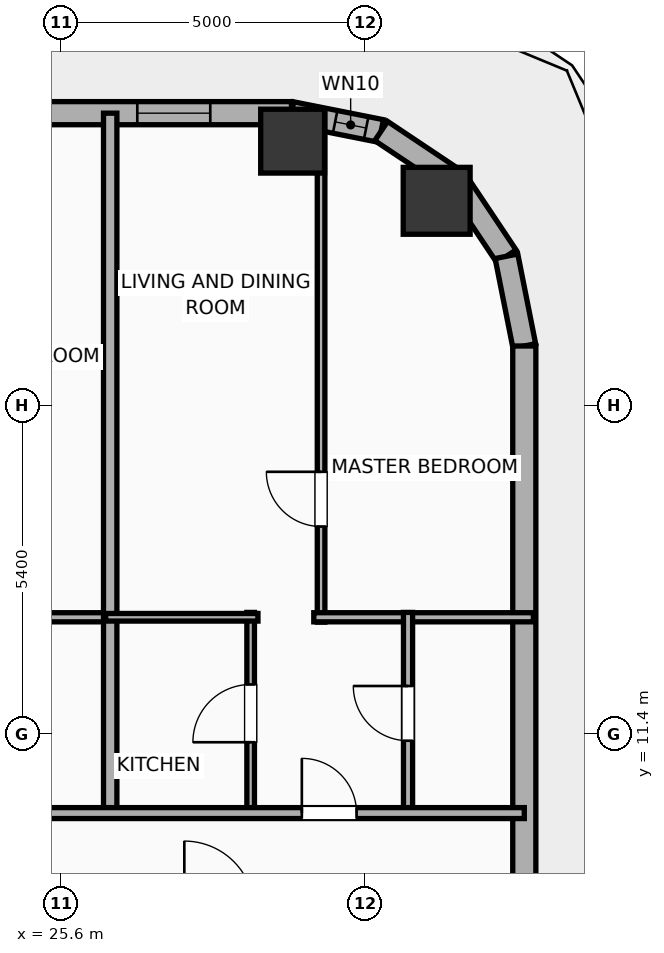
"""IFC4 building model, lengths in metres.
Left out: names, types, materials, properties, quantities, classifications, styles, units other than length and angle.
Written with IfcOpenShell. Run it as: python <this file> out.ifc"""

import sys

from ifc_helpers import new_model, si_unit, direction, frame, frame_2d, origin, origin_2d, place, context, subcontext, project, spatial, rectangle, hollow_rectangle, hollow_circle, extrude, element, fill, save


model = new_model("IFC4")
c1 = context("Model", 3, precision=1e-05, world=origin(), true_north=direction((0.0, 1.0)))
c2 = subcontext(c1, "Body", "Model", "MODEL_VIEW")
j1 = project(units=[si_unit("LENGTHUNIT", "METRE"), si_unit("PLANEANGLEUNIT", "RADIAN")], contexts=[c1])
p1 = place(None, origin())
s1 = spatial("IfcSite", under=j1, at=p1, CompositionType="ELEMENT")
p2 = place(p1, origin())
s2 = spatial("IfcBuilding", under=s1, at=p2, CompositionType="ELEMENT")
p3 = place(p2, frame((0.0, 0.0, 113.1)))
s3 = spatial("IfcBuildingStorey", under=s2, at=p3, CompositionType="ELEMENT", Elevation=113.1)
p4 = place(p3, frame((31.769, 20.169, 0.0), z_axis=(0.0, 0.0, 1.0), x_axis=(1.0, 0.0, 0.0)))
e1 = element("IfcColumn", 1, at=p4, inside=s3, PredefinedType="COLUMN", context=c2, shape_type="SweptSolid", body=[
    extrude(hollow_circle(Radius=0.55, WallThickness=0.036, at=origin_2d()), origin(), (0.0, 0.0, 1.0), 3.9),
])
p5 = place(p3, frame((29.4, 21.15, 0.0), z_axis=(0.0, 0.0, 1.0), x_axis=(1.0, 0.0, 0.0)))
e2 = element("IfcColumn", 2, at=p5, inside=s3, PredefinedType="COLUMN", context=c2, shape_type="SweptSolid", body=[
    extrude(hollow_rectangle(XDim=1.05, YDim=1.05, WallThickness=0.036, at=origin_2d()), origin(), (0.0, 0.0, 1.0), 3.9),
])
p6 = place(p3, frame((-25.381, 21.61, 0.0), z_axis=(0.0, 0.0, 1.0), x_axis=(1.0, 0.0, 0.0)))
e3 = element("IfcWall", 3, at=p6, inside=s3, PredefinedType="ELEMENTEDWALL", context=c2, shape_type="SweptSolid", body=[
    extrude(rectangle(XDim=54.763, YDim=0.38, at=frame_2d((27.381, 0.0))), origin(), (0.0, 0.0, 1.0), 3.65),
])
p7 = place(p6, frame((5.645, 0.0, 0.75)))
e4 = element("IfcOpeningElement", 4, at=p7, cuts=e3, PredefinedType="OPENING", context=c2, shape_type="SweptSolid", body=[
    extrude(rectangle(XDim=2.4, YDim=2.1, at=frame_2d((1.2, 1.05))), frame((0.0, 0.2, 0.0), z_axis=(0.0, -1.0, 0.0), x_axis=(1.0, 0.0, 0.0)), (0.0, 0.0, 1.0), 0.4),
])
p8 = place(p6, frame((34.677, 0.0, 0.75)))
e5 = element("IfcOpeningElement", 5, at=p8, cuts=e3, PredefinedType="OPENING", context=c2, shape_type="SweptSolid", body=[
    extrude(rectangle(XDim=2.4, YDim=2.1, at=frame_2d((1.2, 1.05))), frame((0.0, 0.2, 0.0), z_axis=(0.0, -1.0, 0.0), x_axis=(1.0, 0.0, 0.0)), (0.0, 0.0, 1.0), 0.4),
])
p9 = place(p6, frame((45.067, 0.0, 0.75)))
e6 = element("IfcOpeningElement", 6, at=p9, cuts=e3, PredefinedType="OPENING", context=c2, shape_type="SweptSolid", body=[
    extrude(rectangle(XDim=2.4, YDim=2.1, at=frame_2d((1.2, 1.05))), frame((0.0, 0.2, 0.0), z_axis=(0.0, -1.0, 0.0), x_axis=(1.0, 0.0, 0.0)), (0.0, 0.0, 1.0), 0.4),
])
p10 = place(p6, frame((2.938, 0.0, 0.75)))
e7 = element("IfcOpeningElement", 7, at=p10, cuts=e3, PredefinedType="OPENING", context=c2, shape_type="SweptSolid", body=[
    extrude(rectangle(XDim=1.2, YDim=2.05, at=frame_2d((0.6, 1.025))), frame((0.0, 0.2, 0.0), z_axis=(0.0, -1.0, 0.0), x_axis=(1.0, 0.0, 0.0)), (0.0, 0.0, 1.0), 0.4),
])
p11 = place(p6, frame((8.916, 0.0, 0.75)))
e8 = element("IfcOpeningElement", 8, at=p11, cuts=e3, PredefinedType="OPENING", context=c2, shape_type="SweptSolid", body=[
    extrude(rectangle(XDim=1.2, YDim=2.05, at=frame_2d((0.6, 1.025))), frame((0.0, 0.2, 0.0), z_axis=(0.0, -1.0, 0.0), x_axis=(1.0, 0.0, 0.0)), (0.0, 0.0, 1.0), 0.4),
])
p12 = place(p6, frame((13.476, 0.0, 0.75)))
e9 = element("IfcOpeningElement", 9, at=p12, cuts=e3, PredefinedType="OPENING", context=c2, shape_type="SweptSolid", body=[
    extrude(rectangle(XDim=1.2, YDim=2.05, at=frame_2d((0.6, 1.025))), frame((0.0, 0.2, 0.0), z_axis=(0.0, -1.0, 0.0), x_axis=(1.0, 0.0, 0.0)), (0.0, 0.0, 1.0), 0.4),
])
p13 = place(p6, frame((17.076, 0.0, 0.75)))
e10 = element("IfcOpeningElement", 10, at=p13, cuts=e3, PredefinedType="OPENING", context=c2, shape_type="SweptSolid", body=[
    extrude(rectangle(XDim=1.2, YDim=2.05, at=frame_2d((0.6, 1.025))), frame((0.0, 0.2, 0.0), z_axis=(0.0, -1.0, 0.0), x_axis=(1.0, 0.0, 0.0)), (0.0, 0.0, 1.0), 0.4),
])
p14 = place(p6, frame((19.956, 0.0, 0.75)))
e11 = element("IfcOpeningElement", 11, at=p14, cuts=e3, PredefinedType="OPENING", context=c2, shape_type="SweptSolid", body=[
    extrude(rectangle(XDim=1.2, YDim=2.05, at=frame_2d((0.6, 1.025))), frame((0.0, 0.2, 0.0), z_axis=(0.0, -1.0, 0.0), x_axis=(1.0, 0.0, 0.0)), (0.0, 0.0, 1.0), 0.4),
])
p15 = place(p6, frame((24.276, 0.0, 0.75)))
e12 = element("IfcOpeningElement", 12, at=p15, cuts=e3, PredefinedType="OPENING", context=c2, shape_type="SweptSolid", body=[
    extrude(rectangle(XDim=1.2, YDim=2.05, at=frame_2d((0.6, 1.025))), frame((0.0, 0.2, 0.0), z_axis=(0.0, -1.0, 0.0), x_axis=(1.0, 0.0, 0.0)), (0.0, 0.0, 1.0), 0.4),
])
p16 = place(p6, frame((27.876, 0.0, 0.75)))
e13 = element("IfcOpeningElement", 13, at=p16, cuts=e3, PredefinedType="OPENING", context=c2, shape_type="SweptSolid", body=[
    extrude(rectangle(XDim=1.2, YDim=2.05, at=frame_2d((0.6, 1.025))), frame((0.0, 0.2, 0.0), z_axis=(0.0, -1.0, 0.0), x_axis=(1.0, 0.0, 0.0)), (0.0, 0.0, 1.0), 0.4),
])
p17 = place(p6, frame((30.876, 0.0, 0.75)))
e14 = element("IfcOpeningElement", 14, at=p17, cuts=e3, PredefinedType="OPENING", context=c2, shape_type="SweptSolid", body=[
    extrude(rectangle(XDim=1.2, YDim=2.05, at=frame_2d((0.6, 1.025))), frame((0.0, 0.2, 0.0), z_axis=(0.0, -1.0, 0.0), x_axis=(1.0, 0.0, 0.0)), (0.0, 0.0, 1.0), 0.4),
])
p18 = place(p6, frame((38.676, 0.0, 0.75)))
e15 = element("IfcOpeningElement", 15, at=p18, cuts=e3, PredefinedType="OPENING", context=c2, shape_type="SweptSolid", body=[
    extrude(rectangle(XDim=1.2, YDim=2.05, at=frame_2d((0.6, 1.025))), frame((0.0, 0.2, 0.0), z_axis=(0.0, -1.0, 0.0), x_axis=(1.0, 0.0, 0.0)), (0.0, 0.0, 1.0), 0.4),
])
p19 = place(p6, frame((41.796, 0.0, 0.75)))
e16 = element("IfcOpeningElement", 16, at=p19, cuts=e3, PredefinedType="OPENING", context=c2, shape_type="SweptSolid", body=[
    extrude(rectangle(XDim=1.2, YDim=2.05, at=frame_2d((0.6, 1.025))), frame((0.0, 0.2, 0.0), z_axis=(0.0, -1.0, 0.0), x_axis=(1.0, 0.0, 0.0)), (0.0, 0.0, 1.0), 0.4),
])
p20 = place(p6, frame((49.476, 0.0, 0.75)))
e17 = element("IfcOpeningElement", 17, at=p20, cuts=e3, PredefinedType="OPENING", context=c2, shape_type="SweptSolid", body=[
    extrude(rectangle(XDim=1.2, YDim=2.05, at=frame_2d((0.6, 1.025))), frame((0.0, 0.2, 0.0), z_axis=(0.0, -1.0, 0.0), x_axis=(1.0, 0.0, 0.0)), (0.0, 0.0, 1.0), 0.4),
])
p21 = place(p6, frame((52.227, 0.0, 0.75)))
e18 = element("IfcOpeningElement", 18, at=p21, cuts=e3, PredefinedType="OPENING", context=c2, shape_type="SweptSolid", body=[
    extrude(rectangle(XDim=1.2, YDim=2.05, at=frame_2d((0.6, 1.025))), frame((0.0, 0.2, 0.0), z_axis=(0.0, -1.0, 0.0), x_axis=(1.0, 0.0, 0.0)), (0.0, 0.0, 1.0), 0.4),
])
p22 = place(p3, frame((29.381, 21.61, 0.0), z_axis=(0.0, 0.0, 1.0), x_axis=(0.980755066645, -0.195242155415, 0.0)))
e19 = element("IfcWall", 19, at=p22, inside=s3, PredefinedType="ELEMENTEDWALL", context=c2, shape_type="SweptSolid", body=[
    extrude(rectangle(XDim=1.504, YDim=0.38, at=frame_2d((0.752, 0.0))), origin(), (0.0, 0.0, 1.0), 3.65),
])
p23 = place(p22, frame((0.732, 0.0, 0.75)))
e20 = element("IfcOpeningElement", 20, at=p23, cuts=e19, PredefinedType="OPENING", context=c2, shape_type="SweptSolid", body=[
    extrude(rectangle(XDim=0.52, YDim=2.05, at=frame_2d((0.26, 1.025))), frame((0.0, 0.2, 0.0), z_axis=(0.0, -1.0, 0.0), x_axis=(1.0, 0.0, 0.0)), (0.0, 0.0, 1.0), 0.4),
])
p24 = place(p3, frame((30.857, 21.316, 0.0), z_axis=(0.0, 0.0, 1.0), x_axis=(0.831468045563, -0.555572577804, 0.0)))
e21 = element("IfcWall", 21, at=p24, inside=s3, PredefinedType="ELEMENTEDWALL", context=c2, shape_type="SweptSolid", body=[
    extrude(rectangle(XDim=1.485, YDim=0.38, at=frame_2d((0.742, 0.0))), origin(), (0.0, 0.0, 1.0), 3.65),
])
p25 = place(p3, frame((32.091, 20.491, 0.0), z_axis=(0.0, 0.0, 1.0), x_axis=(0.555610286119, -0.831442848281, 0.0)))
e22 = element("IfcWall", 22, at=p25, inside=s3, PredefinedType="ELEMENTEDWALL", context=c2, shape_type="SweptSolid", body=[
    extrude(rectangle(XDim=1.485, YDim=0.38, at=frame_2d((0.743, 0.0))), origin(), (0.0, 0.0, 1.0), 3.65),
])
p26 = place(p3, frame((32.917, 19.257, 0.0), z_axis=(0.0, 0.0, 1.0), x_axis=(0.195086038585, -0.980786132421, 0.0)))
e23 = element("IfcWall", 23, at=p26, inside=s3, PredefinedType="ELEMENTEDWALL", context=c2, shape_type="SweptSolid", body=[
    extrude(rectangle(XDim=1.504, YDim=0.38, at=frame_2d((0.752, 0.0))), origin(), (0.0, 0.0, 1.0), 3.65),
])
p27 = place(p3, frame((33.21, 17.781, 0.0), z_axis=(0.0, 0.0, 1.0), x_axis=(0.0, -1.0, 0.0)))
e24 = element("IfcWall", 24, at=p27, inside=s3, PredefinedType="ELEMENTEDWALL", context=c2, shape_type="SweptSolid", body=[
    extrude(rectangle(XDim=34.363, YDim=0.38, at=frame_2d((17.181, 0.0))), origin(), (0.0, 0.0, 1.0), 3.65),
])
p28 = place(p27, frame((31.687, 0.0, 0.75)))
e25 = element("IfcOpeningElement", 25, at=p28, cuts=e24, PredefinedType="OPENING", context=c2, shape_type="SweptSolid", body=[
    extrude(rectangle(XDim=1.2, YDim=2.05, at=frame_2d((0.6, 1.025))), frame((0.0, 0.2, 0.0), z_axis=(0.0, -1.0, 0.0), x_axis=(1.0, 0.0, 0.0)), (0.0, 0.0, 1.0), 0.4),
])
p29 = place(p27, frame((12.836, 0.0, 0.75)))
e26 = element("IfcOpeningElement", 26, at=p29, cuts=e24, PredefinedType="OPENING", context=c2, shape_type="SweptSolid", body=[
    extrude(rectangle(XDim=1.2, YDim=2.05, at=frame_2d((0.6, 1.025))), frame((0.0, 0.2, 0.0), z_axis=(0.0, -1.0, 0.0), x_axis=(1.0, 0.0, 0.0)), (0.0, 0.0, 1.0), 0.4),
])
p30 = place(p27, frame((21.386, 0.0, 0.75)))
e27 = element("IfcOpeningElement", 27, at=p30, cuts=e24, PredefinedType="OPENING", context=c2, shape_type="SweptSolid", body=[
    extrude(rectangle(XDim=1.2, YDim=2.05, at=frame_2d((0.6, 1.025))), frame((0.0, 0.2, 0.0), z_axis=(0.0, -1.0, 0.0), x_axis=(1.0, 0.0, 0.0)), (0.0, 0.0, 1.0), 0.4),
])
p31 = place(p3, frame((22.87, 13.32, 0.0), z_axis=(0.0, 0.0, 1.0), x_axis=(1.0, 0.0, 0.0)))
e28 = element("IfcWall", 28, at=p31, inside=s3, PredefinedType="PLUMBINGWALL", context=c2, shape_type="SweptSolid", body=[
    extrude(rectangle(XDim=3.605, YDim=0.15, at=frame_2d((1.802, 0.0))), origin(), (0.0, 0.0, 1.0), 3.65),
])
p32 = place(p3, frame((26.4, 10.02, 0.0), z_axis=(0.0, 0.0, 1.0), x_axis=(0.0, 1.0, 0.0)))
e29 = element("IfcWall", 29, at=p32, inside=s3, PredefinedType="PARTITIONING", context=c2, shape_type="SweptSolid", body=[
    extrude(rectangle(XDim=11.59, YDim=0.22, at=frame_2d((5.795, 0.0))), origin(), (0.0, 0.0, 1.0), 3.65),
])
p33 = place(p3, frame((29.868, 13.24, 0.0), z_axis=(0.0, 0.0, 1.0), x_axis=(0.0, 1.0, 0.0)))
e30 = element("IfcWall", 30, at=p33, inside=s3, PredefinedType="PARTITIONING", context=c2, shape_type="SweptSolid", body=[
    extrude(rectangle(XDim=8.426, YDim=0.125, at=frame_2d((4.213, 0.0))), origin(), (0.0, 0.0, 1.0), 3.65),
])
p34 = place(p33, frame((1.572, 0.0, 0.0)))
e31 = element("IfcOpeningElement", 31, at=p34, cuts=e30, PredefinedType="OPENING", context=c2, shape_type="SweptSolid", body=[
    extrude(rectangle(XDim=0.9, YDim=2.05, at=frame_2d((0.45, 1.025))), frame((0.0, 0.073, 0.0), z_axis=(0.0, -1.0, 0.0), x_axis=(1.0, 0.0, 0.0)), (0.0, 0.0, 1.0), 0.145),
])
p35 = place(p3, frame((29.748, 13.32, 0.0), z_axis=(0.0, 0.0, 1.0), x_axis=(1.0, 0.0, 0.0)))
e32 = element("IfcWall", 32, at=p35, inside=s3, PredefinedType="PLUMBINGWALL", context=c2, shape_type="SweptSolid", body=[
    extrude(rectangle(XDim=3.612, YDim=0.15, at=frame_2d((1.806, 0.0))), origin(), (0.0, 0.0, 1.0), 3.65),
])
p36 = place(p3, frame((28.71, 10.08, 0.0), z_axis=(0.0, 0.0, 1.0), x_axis=(0.0, 1.0, 0.0)))
e33 = element("IfcWall", 33, at=p36, inside=s3, PredefinedType="PARTITIONING", context=c2, shape_type="SweptSolid", body=[
    extrude(rectangle(XDim=3.32, YDim=0.125, at=frame_2d((1.66, 0.0))), origin(), (0.0, 0.0, 1.0), 3.65),
])
p37 = place(p36, frame((1.185, 0.0, 0.0)))
e34 = element("IfcOpeningElement", 34, at=p37, cuts=e33, PredefinedType="OPENING", context=c2, shape_type="SweptSolid", body=[
    extrude(rectangle(XDim=0.95, YDim=2.05, at=frame_2d((0.475, 1.025))), frame((0.0, 0.073, 0.0), z_axis=(0.0, -1.0, 0.0), x_axis=(1.0, 0.0, 0.0)), (0.0, 0.0, 1.0), 0.145),
])
p38 = place(p3, frame((26.325, 13.32, 0.0), z_axis=(0.0, 0.0, 1.0), x_axis=(1.0, 0.0, 0.0)))
e35 = element("IfcWall", 35, at=p38, inside=s3, PredefinedType="PARTITIONING", context=c2, shape_type="SweptSolid", body=[
    extrude(rectangle(XDim=2.505, YDim=0.125, at=frame_2d((1.252, 0.0))), origin(), (0.0, 0.0, 1.0), 3.65),
])
p39 = place(p3, frame((31.298, 10.08, 0.0), z_axis=(0.0, 0.0, 1.0), x_axis=(0.0, 1.0, 0.0)))
e36 = element("IfcWall", 36, at=p39, inside=s3, PredefinedType="PLUMBINGWALL", context=c2, shape_type="SweptSolid", body=[
    extrude(rectangle(XDim=3.32, YDim=0.15, at=frame_2d((1.66, 0.0))), origin(), (0.0, 0.0, 1.0), 3.65),
])
p40 = place(p39, frame((1.21, 0.0, 0.0)))
e37 = element("IfcOpeningElement", 37, at=p40, cuts=e36, PredefinedType="OPENING", context=c2, shape_type="SweptSolid", body=[
    extrude(rectangle(XDim=0.9, YDim=2.05, at=frame_2d((0.45, 1.025))), frame((0.0, 0.085, 0.0), z_axis=(0.0, -1.0, 0.0), x_axis=(1.0, 0.0, 0.0)), (0.0, 0.0, 1.0), 0.17),
])
p41 = place(p3, frame((-29.21, 10.1, 0.0), z_axis=(0.0, 0.0, 1.0), x_axis=(1.0, 0.0, 0.0)))
e38 = element("IfcWall", 38, at=p41, inside=s3, PredefinedType="PARTITIONING", context=c2, shape_type="SweptSolid", body=[
    extrude(rectangle(XDim=62.42, YDim=0.18, at=frame_2d((31.21, 0.0))), origin(), (0.0, 0.0, 1.0), 3.65),
])
p42 = place(p41, frame((2.74, 0.0, 0.0)))
e39 = element("IfcOpeningElement", 39, at=p42, cuts=e38, PredefinedType="OPENING", context=c2, shape_type="SweptSolid", body=[
    extrude(rectangle(XDim=0.9, YDim=2.05, at=frame_2d((0.45, 1.025))), frame((0.0, 0.1, 0.0), z_axis=(0.0, -1.0, 0.0), x_axis=(1.0, 0.0, 0.0)), (0.0, 0.0, 1.0), 0.2),
])
p43 = place(p41, frame((9.868, 0.0, 0.0)))
e40 = element("IfcOpeningElement", 40, at=p43, cuts=e38, PredefinedType="OPENING", context=c2, shape_type="SweptSolid", body=[
    extrude(rectangle(XDim=1.15, YDim=2.05, at=frame_2d((0.575, 1.025))), frame((0.0, 0.1, 0.0), z_axis=(0.0, -1.0, 0.0), x_axis=(1.0, 0.0, 0.0)), (0.0, 0.0, 1.0), 0.2),
])
p44 = place(p41, frame((15.598, 0.0, 0.0)))
e41 = element("IfcOpeningElement", 41, at=p44, cuts=e38, PredefinedType="OPENING", context=c2, shape_type="SweptSolid", body=[
    extrude(rectangle(XDim=1.15, YDim=2.05, at=frame_2d((0.575, 1.025))), frame((0.0, 0.1, 0.0), z_axis=(0.0, -1.0, 0.0), x_axis=(1.0, 0.0, 0.0)), (0.0, 0.0, 1.0), 0.2),
])
p45 = place(p41, frame((22.801, 0.0, 0.0)))
e42 = element("IfcOpeningElement", 42, at=p45, cuts=e38, PredefinedType="OPENING", context=c2, shape_type="SweptSolid", body=[
    extrude(rectangle(XDim=1.15, YDim=2.05, at=frame_2d((0.575, 1.025))), frame((0.0, 0.1, 0.0), z_axis=(0.0, -1.0, 0.0), x_axis=(1.0, 0.0, 0.0)), (0.0, 0.0, 1.0), 0.2),
])
p46 = place(p41, frame((29.998, 0.0, 0.0)))
e43 = element("IfcOpeningElement", 43, at=p46, cuts=e38, PredefinedType="OPENING", context=c2, shape_type="SweptSolid", body=[
    extrude(rectangle(XDim=1.15, YDim=2.05, at=frame_2d((0.575, 1.025))), frame((0.0, 0.1, 0.0), z_axis=(0.0, -1.0, 0.0), x_axis=(1.0, 0.0, 0.0)), (0.0, 0.0, 1.0), 0.2),
])
p47 = place(p41, frame((37.202, 0.0, 0.0)))
e44 = element("IfcOpeningElement", 44, at=p47, cuts=e38, PredefinedType="OPENING", context=c2, shape_type="SweptSolid", body=[
    extrude(rectangle(XDim=1.15, YDim=2.05, at=frame_2d((0.575, 1.025))), frame((0.0, 0.1, 0.0), z_axis=(0.0, -1.0, 0.0), x_axis=(1.0, 0.0, 0.0)), (0.0, 0.0, 1.0), 0.2),
])
p48 = place(p41, frame((44.399, 0.0, 0.0)))
e45 = element("IfcOpeningElement", 45, at=p48, cuts=e38, PredefinedType="OPENING", context=c2, shape_type="SweptSolid", body=[
    extrude(rectangle(XDim=1.15, YDim=2.05, at=frame_2d((0.575, 1.025))), frame((0.0, 0.1, 0.0), z_axis=(0.0, -1.0, 0.0), x_axis=(1.0, 0.0, 0.0)), (0.0, 0.0, 1.0), 0.2),
])
p49 = place(p41, frame((51.602, 0.0, 0.0)))
e46 = element("IfcOpeningElement", 46, at=p49, cuts=e38, PredefinedType="OPENING", context=c2, shape_type="SweptSolid", body=[
    extrude(rectangle(XDim=1.15, YDim=2.05, at=frame_2d((0.575, 1.025))), frame((0.0, 0.1, 0.0), z_axis=(0.0, -1.0, 0.0), x_axis=(1.0, 0.0, 0.0)), (0.0, 0.0, 1.0), 0.2),
])
p50 = place(p41, frame((58.762, 0.0, 0.0)))
e47 = element("IfcOpeningElement", 47, at=p50, cuts=e38, PredefinedType="OPENING", context=c2, shape_type="SweptSolid", body=[
    extrude(rectangle(XDim=0.9, YDim=2.05, at=frame_2d((0.45, 1.025))), frame((0.0, 0.1, 0.0), z_axis=(0.0, -1.0, 0.0), x_axis=(1.0, 0.0, 0.0)), (0.0, 0.0, 1.0), 0.2),
])
p51 = place(p21, origin())
e48 = element("IfcWindow", 48, at=p51, inside=s3, PartitioningType="SINGLE_PANEL", PredefinedType="WINDOW", context=c2, shape_type="SweptSolid", body=[
    extrude(rectangle(XDim=1.2, YDim=2.05, at=frame_2d((0.6, 1.025))), frame((0.0, 0.03, 0.0), z_axis=(0.0, -1.0, 0.0), x_axis=(1.0, 0.0, 0.0)), (0.0, 0.0, 1.0), 0.06),
])
fill(e18, e48)
p52 = place(p23, origin())
e49 = element("IfcWindow", 49, at=p52, inside=s3, PartitioningType="SINGLE_PANEL", PredefinedType="WINDOW", context=c2, shape_type="SweptSolid", body=[
    extrude(rectangle(XDim=0.52, YDim=2.05, at=frame_2d((0.26, 1.025))), frame((0.0, 0.03, 0.0), z_axis=(0.0, -1.0, 0.0), x_axis=(1.0, 0.0, 0.0)), (0.0, 0.0, 1.0), 0.06),
])
fill(e20, e49)
p53 = place(p34, origin())
e50 = element("IfcDoor", 50, at=p53, inside=s3, OperationType="SINGLE_SWING_RIGHT", PredefinedType="DOOR", context=c2, shape_type="SweptSolid", body=[
    extrude(rectangle(XDim=0.9, YDim=2.05, at=frame_2d((0.45, 1.025))), frame((0.0, 0.025, 0.0), z_axis=(0.0, -1.0, 0.0), x_axis=(1.0, 0.0, 0.0)), (0.0, 0.0, 1.0), 0.05),
])
fill(e31, e50)
p54 = place(p37, origin())
e51 = element("IfcDoor", 51, at=p54, inside=s3, OperationType="SINGLE_SWING_LEFT", PredefinedType="DOOR", context=c2, shape_type="SweptSolid", body=[
    extrude(rectangle(XDim=0.95, YDim=2.05, at=frame_2d((0.475, 1.025))), frame((0.0, 0.025, 0.0), z_axis=(0.0, -1.0, 0.0), x_axis=(1.0, 0.0, 0.0)), (0.0, 0.0, 1.0), 0.05),
])
fill(e34, e51)
p55 = place(p40, origin())
e52 = element("IfcDoor", 52, at=p55, inside=s3, OperationType="SINGLE_SWING_RIGHT", PredefinedType="DOOR", context=c2, shape_type="SweptSolid", body=[
    extrude(rectangle(XDim=0.9, YDim=2.05, at=frame_2d((0.45, 1.025))), frame((0.0, 0.025, 0.0), z_axis=(0.0, -1.0, 0.0), x_axis=(1.0, 0.0, 0.0)), (0.0, 0.0, 1.0), 0.05),
])
fill(e37, e52)
p56 = place(p50, origin())
e53 = element("IfcDoor", 53, at=p56, inside=s3, OperationType="SINGLE_SWING_LEFT", PredefinedType="DOOR", context=c2, shape_type="SweptSolid", body=[
    extrude(rectangle(XDim=0.9, YDim=2.05, at=frame_2d((0.45, 1.025))), frame((0.0, 0.025, 0.0), z_axis=(0.0, -1.0, 0.0), x_axis=(1.0, 0.0, 0.0)), (0.0, 0.0, 1.0), 0.05),
])
fill(e47, e53)
save(model, sys.argv[1])
